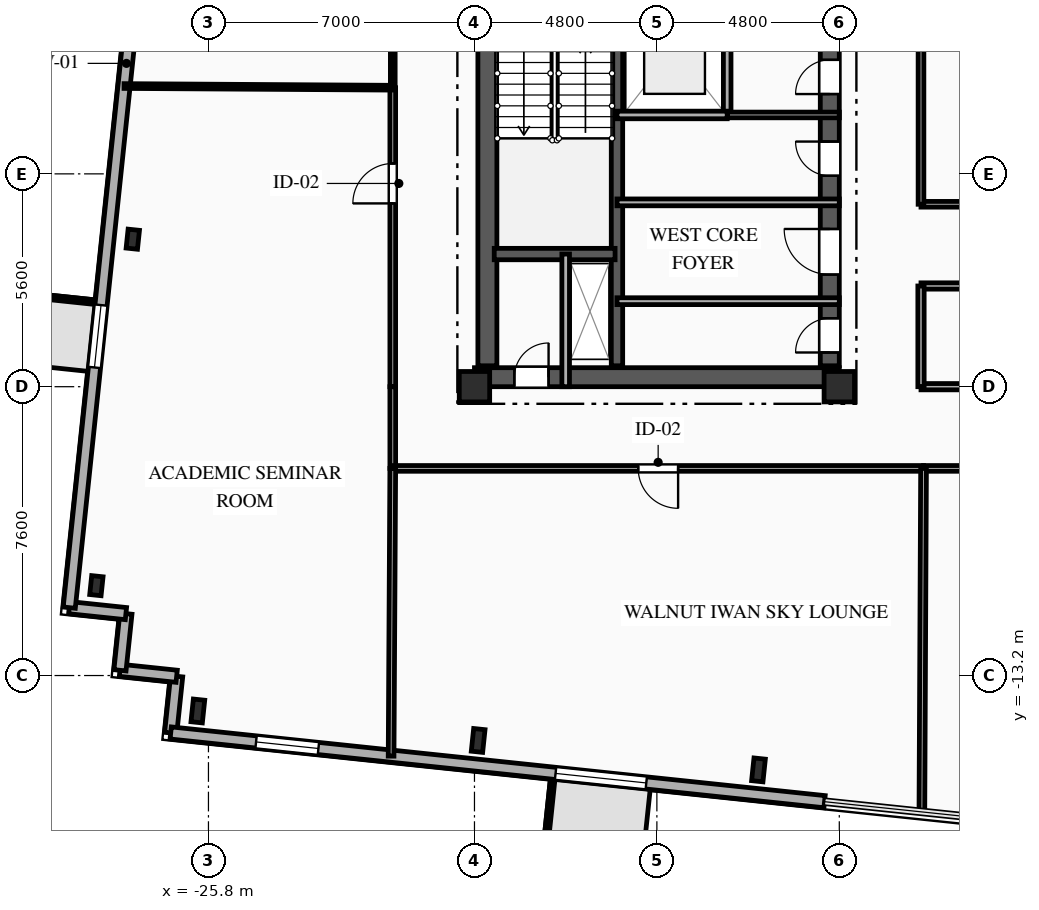
"""IFC4 building model, lengths in metres.
Left out: names, types, materials, properties, quantities, classifications, styles, units other than length and angle.
Written with IfcOpenShell. Run it as: python <this file> out.ifc"""

import sys

from ifc_helpers import new_model, si_unit, direction, frame, frame_2d, origin, origin_2d, place, context, subcontext, project, spatial, rectangle, i_section, extrude, element, fill, save


model = new_model("IFC4")
c1 = context("Model", 3, precision=1e-05, world=origin(), true_north=direction((0.0, 1.0)))
c2 = subcontext(c1, "Body", "Model", "MODEL_VIEW")
j1 = project(units=[si_unit("LENGTHUNIT", "METRE"), si_unit("PLANEANGLEUNIT", "RADIAN")], contexts=[c1])
p1 = place(None, origin())
s1 = spatial("IfcSite", under=j1, at=p1, CompositionType="ELEMENT")
p2 = place(p1, origin())
s2 = spatial("IfcBuilding", under=s1, at=p2, CompositionType="ELEMENT")
p3 = place(p2, frame((0.0, 0.0, 203.1)))
s3 = spatial("IfcBuildingStorey", under=s2, at=p3, CompositionType="ELEMENT", Elevation=203.1)
for number, where, z_axis, x_axis in (
    (1, (-18.8, -5.6, 0.0), (0.0, 0.0, 1.0), (1.0, 0.0, 0.0)),
    (2, (-9.2, -5.6, 0.0), (0.0, 0.0, 1.0), (1.0, 0.0, 0.0)),
):
    element("IfcColumn", number, at=place(p3, frame(where, z_axis=z_axis, x_axis=x_axis)), inside=s3, PredefinedType="COLUMN", context=c2, shape_type="SweptSolid", body=[
        extrude(rectangle(XDim=0.8, YDim=0.8, at=origin_2d()), origin(), (0.0, 0.0, 1.0), 3.35),
    ])
for number, where, z_axis, x_axis in (
    (3, (-26.079, -14.133, 0.0), (0.0, 0.0, 1.0), (0.995, -0.105, 0.0)),
    (4, (-18.703, -14.908, 0.0), (0.0, 0.0, 1.0), (0.995, -0.105, 0.0)),
    (5, (-11.327, -15.683, 0.0), (0.0, 0.0, 1.0), (0.995, -0.105, 0.0)),
):
    element("IfcColumn", number, at=place(p3, frame(where, z_axis=z_axis, x_axis=x_axis)), inside=s3, PredefinedType="COLUMN", context=c2, shape_type="SweptSolid", body=[
        extrude(i_section(OverallWidth=0.3, OverallDepth=0.6, WebThickness=0.015, FlangeThickness=0.03, FilletRadius=0.027, at=origin_2d()), origin(), (0.0, 0.0, 1.0), 3.35),
    ])
for number, where, z_axis, x_axis in (
    (6, (-27.791, -1.719, 0.0), (0.0, 0.0, 1.0), (0.995, -0.105, 0.0)),
    (7, (-28.749, -10.835, 0.0), (0.0, 0.0, 1.0), (0.995, -0.105, 0.0)),
):
    element("IfcColumn", number, at=place(p3, frame(where, z_axis=z_axis, x_axis=x_axis)), inside=s3, PredefinedType="COLUMN", context=c2, shape_type="SweptSolid", body=[
        extrude(i_section(OverallWidth=0.3, OverallDepth=0.5, WebThickness=0.014, FlangeThickness=0.028, FilletRadius=0.027, at=origin_2d()), origin(), (0.0, 0.0, 1.0), 3.35),
    ])
for number, where, z_axis, x_axis in (
    (8, (-26.793, -14.711, 0.0), (0.0, 0.0, 1.0), (0.104, 0.995, 0.0)),
    (9, (-26.637, -13.219, 0.0), (0.0, 0.0, 1.0), (-0.995, 0.104, 0.0)),
):
    element("IfcWall", number, at=place(p3, frame(where, z_axis=z_axis, x_axis=x_axis)), inside=s3, PredefinedType="SOLIDWALL", context=c2, shape_type="SweptSolid", body=[
        extrude(rectangle(XDim=1.5, YDim=0.32, at=frame_2d((0.75, 0.0))), origin(), (0.0, 0.0, 1.0), 3.04),
    ])
p4 = place(p3, frame((-28.128, -13.062, 0.0), z_axis=(0.0, 0.0, 1.0), x_axis=(0.104481464157, 0.994526834051, 0.0)))
e10 = element("IfcWall", 10, at=p4, inside=s3, PredefinedType="SOLIDWALL", context=c2, shape_type="SweptSolid", body=[
    extrude(rectangle(XDim=1.5, YDim=0.32, at=frame_2d((0.75, 0.0))), origin(), (0.0, 0.0, 1.0), 3.04),
])
p5 = place(p3, frame((-27.972, -11.571, 0.0), z_axis=(0.0, 0.0, 1.0), x_axis=(-0.994525057048, 0.104498377516, 0.0)))
e11 = element("IfcWall", 11, at=p5, inside=s3, PredefinedType="SOLIDWALL", context=c2, shape_type="SweptSolid", body=[
    extrude(rectangle(XDim=1.5, YDim=0.32, at=frame_2d((0.75, 0.0))), origin(), (0.0, 0.0, 1.0), 3.04),
])
p6 = place(p3, frame((-29.463, -11.414, 0.0), z_axis=(0.0, 0.0, 1.0), x_axis=(0.104530779244, 0.994521651947, 0.0)))
e12 = element("IfcWall", 12, at=p6, inside=s3, PredefinedType="SOLIDWALL", context=c2, shape_type="SweptSolid", body=[
    extrude(rectangle(XDim=28.8, YDim=0.32, at=frame_2d((14.4, 0.0))), origin(), (0.0, 0.0, 1.0), 3.04),
])
p7 = place(p6, frame((6.355, 0.0, 0.85)))
e13 = element("IfcOpeningElement", 13, at=p7, cuts=e12, PredefinedType="OPENING", context=c2, shape_type="SweptSolid", body=[
    extrude(rectangle(XDim=1.65, YDim=1.85, at=frame_2d((0.825, 0.925))), frame((0.0, 0.17, 0.0), z_axis=(0.0, -1.0, 0.0), x_axis=(1.0, 0.0, 0.0)), (0.0, 0.0, 1.0), 0.34),
])
p8 = place(p6, frame((20.339, 0.0, 0.85)))
e14 = element("IfcOpeningElement", 14, at=p8, cuts=e12, PredefinedType="OPENING", context=c2, shape_type="SweptSolid", body=[
    extrude(rectangle(XDim=1.6, YDim=1.85, at=frame_2d((0.8, 0.925))), frame((0.0, 0.17, 0.0), z_axis=(0.0, -1.0, 0.0), x_axis=(1.0, 0.0, 0.0)), (0.0, 0.0, 1.0), 0.34),
])
p9 = place(p3, frame((-9.588, -16.519, 0.0), z_axis=(0.0, 0.0, 1.0), x_axis=(-0.994521911171, 0.104528312915, 0.0)))
e15 = element("IfcWall", 15, at=p9, inside=s3, PredefinedType="SOLIDWALL", context=c2, shape_type="SweptSolid", body=[
    extrude(rectangle(XDim=17.3, YDim=0.32, at=frame_2d((8.65, 0.0))), origin(), (0.0, 0.0, 1.0), 3.04),
])
p10 = place(p9, frame((4.717, 0.0, 0.85)))
e16 = element("IfcOpeningElement", 16, at=p10, cuts=e15, PredefinedType="OPENING", context=c2, shape_type="SweptSolid", body=[
    extrude(rectangle(XDim=2.4, YDim=1.95, at=frame_2d((1.2, 0.975))), frame((0.0, 0.17, 0.0), z_axis=(0.0, -1.0, 0.0), x_axis=(1.0, 0.0, 0.0)), (0.0, 0.0, 1.0), 0.34),
])
p11 = place(p9, frame((13.392, 0.0, 0.85)))
e17 = element("IfcOpeningElement", 17, at=p11, cuts=e15, PredefinedType="OPENING", context=c2, shape_type="SweptSolid", body=[
    extrude(rectangle(XDim=1.65, YDim=1.85, at=frame_2d((0.825, 0.925))), frame((0.0, 0.17, 0.0), z_axis=(0.0, -1.0, 0.0), x_axis=(1.0, 0.0, 0.0)), (0.0, 0.0, 1.0), 0.34),
])
p12 = place(p3, frame((-18.8, -5.35, 0.0), z_axis=(0.0, 0.0, 1.0), x_axis=(1.0, 0.0, 0.0)))
e18 = element("IfcWall", 18, at=p12, inside=s3, PredefinedType="SHEAR", context=c2, shape_type="SweptSolid", body=[
    extrude(rectangle(XDim=9.6, YDim=0.5, at=frame_2d((4.8, 0.0))), origin(), (0.0, 0.0, 1.0), 3.04),
])
p13 = place(p12, frame((1.05, 0.0, 0.0)))
e19 = element("IfcOpeningElement", 19, at=p13, cuts=e18, PredefinedType="OPENING", context=c2, shape_type="SweptSolid", body=[
    extrude(rectangle(XDim=0.9, YDim=2.1, at=frame_2d((0.45, 1.05))), frame((0.0, 0.26, 0.0), z_axis=(0.0, -1.0, 0.0), x_axis=(1.0, 0.0, 0.0)), (0.0, 0.0, 1.0), 0.52),
])
p14 = place(p3, frame((-18.46, -5.05, 0.0), z_axis=(0.0, 0.0, 1.0), x_axis=(0.0, 1.0, 0.0)))
e20 = element("IfcWall", 20, at=p14, inside=s3, PredefinedType="SHEAR", context=c2, shape_type="SweptSolid", body=[
    extrude(rectangle(XDim=10.1, YDim=0.5, at=frame_2d((5.05, 0.0))), origin(), (0.0, 0.0, 1.0), 3.04),
])
p15 = place(p3, frame((-9.45, -5.05, 0.0), z_axis=(0.0, 0.0, 1.0), x_axis=(0.0, 1.0, 0.0)))
e21 = element("IfcWall", 21, at=p15, inside=s3, PredefinedType="SHEAR", context=c2, shape_type="SweptSolid", body=[
    extrude(rectangle(XDim=10.1, YDim=0.5, at=frame_2d((5.05, 0.0))), origin(), (0.0, 0.0, 1.0), 3.04),
])
p16 = place(p15, frame((7.15, 0.0, 0.0)))
e22 = element("IfcOpeningElement", 22, at=p16, cuts=e21, PredefinedType="OPENING", context=c2, shape_type="SweptSolid", body=[
    extrude(rectangle(XDim=0.9, YDim=2.1, at=frame_2d((0.45, 1.05))), frame((0.0, 0.26, 0.0), z_axis=(0.0, -1.0, 0.0), x_axis=(1.0, 0.0, 0.0)), (0.0, 0.0, 1.0), 0.52),
])
p17 = place(p15, frame((2.4, 0.0, 0.0)))
e23 = element("IfcOpeningElement", 23, at=p17, cuts=e21, PredefinedType="OPENING", context=c2, shape_type="SweptSolid", body=[
    extrude(rectangle(XDim=1.2, YDim=2.15, at=frame_2d((0.6, 1.075))), frame((0.0, 0.26, 0.0), z_axis=(0.0, -1.0, 0.0), x_axis=(1.0, 0.0, 0.0)), (0.0, 0.0, 1.0), 0.52),
])
p18 = place(p15, frame((0.35, 0.0, 0.0)))
e24 = element("IfcOpeningElement", 24, at=p18, cuts=e21, PredefinedType="OPENING", context=c2, shape_type="SweptSolid", body=[
    extrude(rectangle(XDim=0.9, YDim=2.1, at=frame_2d((0.45, 1.05))), frame((0.0, 0.26, 0.0), z_axis=(0.0, -1.0, 0.0), x_axis=(1.0, 0.0, 0.0)), (0.0, 0.0, 1.0), 0.52),
])
p19 = place(p15, frame((5.0, 0.0, 0.0)))
e25 = element("IfcOpeningElement", 25, at=p19, cuts=e21, PredefinedType="OPENING", context=c2, shape_type="SweptSolid", body=[
    extrude(rectangle(XDim=0.9, YDim=2.1, at=frame_2d((0.45, 1.05))), frame((0.0, 0.26, 0.0), z_axis=(0.0, -1.0, 0.0), x_axis=(1.0, 0.0, 0.0)), (0.0, 0.0, 1.0), 0.52),
])
p20 = place(p3, frame((-15.05, -5.05, 0.0), z_axis=(0.0, 0.0, 1.0), x_axis=(0.0, 1.0, 0.0)))
e26 = element("IfcWall", 26, at=p20, inside=s3, PredefinedType="SHEAR", context=c2, shape_type="SweptSolid", body=[
    extrude(rectangle(XDim=10.1, YDim=0.3, at=frame_2d((5.05, 0.0))), origin(), (0.0, 0.0, 1.0), 3.04),
])
p21 = place(p3, frame((-18.28, -2.11, 0.0), z_axis=(0.0, 0.0, 1.0), x_axis=(1.0, 0.0, 0.0)))
e27 = element("IfcWall", 27, at=p21, inside=s3, PredefinedType="SHEAR", context=c2, shape_type="SweptSolid", body=[
    extrude(rectangle(XDim=3.18, YDim=0.3, at=frame_2d((1.59, 0.0))), origin(), (0.0, 0.0, 1.0), 3.04),
])
p22 = place(p3, frame((-16.4, -5.6, 0.0), z_axis=(0.0, 0.0, 1.0), x_axis=(0.0, 1.0, 0.0)))
e28 = element("IfcWall", 28, at=p22, inside=s3, PredefinedType="PARTITIONING", context=c2, shape_type="SweptSolid", body=[
    extrude(rectangle(XDim=3.49, YDim=0.2, at=frame_2d((1.745, 0.0))), origin(), (0.0, 0.0, 1.0), 3.04),
])
p23 = place(p3, frame((-12.15, 1.55, 0.0), z_axis=(0.0, 0.0, 1.0), x_axis=(0.0, 1.0, 0.0)))
e29 = element("IfcWall", 29, at=p23, inside=s3, PredefinedType="PARTITIONING", context=c2, shape_type="SweptSolid", body=[
    extrude(rectangle(XDim=4.05, YDim=0.2, at=frame_2d((2.025, 0.0))), origin(), (0.0, 0.0, 1.0), 3.04),
])
p24 = place(p3, frame((-12.15, 1.55, 0.0), z_axis=(0.0, 0.0, 1.0), x_axis=(1.0, 0.0, 0.0)))
e30 = element("IfcWall", 30, at=p24, inside=s3, PredefinedType="PARTITIONING", context=c2, shape_type="SweptSolid", body=[
    extrude(rectangle(XDim=2.95, YDim=0.15, at=frame_2d((1.475, 0.0))), origin(), (0.0, 0.0, 1.0), 3.04),
])
p25 = place(p3, frame((-15.05, -3.35, 0.0), z_axis=(0.0, 0.0, 1.0), x_axis=(1.0, 0.0, 0.0)))
e31 = element("IfcWall", 31, at=p25, inside=s3, PredefinedType="PARTITIONING", context=c2, shape_type="SweptSolid", body=[
    extrude(rectangle(XDim=5.85, YDim=0.18, at=frame_2d((2.925, 0.0))), origin(), (0.0, 0.0, 1.0), 2.755),
])
p26 = place(p3, frame((-9.2, -0.75, 0.0), z_axis=(0.0, 0.0, 1.0), x_axis=(-1.0, 0.0, 0.0)))
e32 = element("IfcWall", 32, at=p26, inside=s3, PredefinedType="PARTITIONING", context=c2, shape_type="SweptSolid", body=[
    extrude(rectangle(XDim=5.85, YDim=0.18, at=frame_2d((2.925, 0.0))), origin(), (0.0, 0.0, 1.0), 3.04),
])
p27 = place(p3, frame((-20.95, -7.75, 0.0), z_axis=(0.0, 0.0, 1.0), x_axis=(0.0, 1.0, 0.0)))
e33 = element("IfcWall", 33, at=p27, inside=s3, PredefinedType="PARTITIONING", context=c2, shape_type="SweptSolid", body=[
    extrude(rectangle(XDim=2.15, YDim=0.15, at=frame_2d((1.075, 0.0))), origin(), (0.0, 0.0, 1.0), 3.04),
])
p28 = place(p3, frame((-6.983, -7.75, 0.0), z_axis=(0.0, 0.0, 1.0), x_axis=(-1.0, 0.0, 0.0)))
e34 = element("IfcWall", 34, at=p28, inside=s3, PredefinedType="PARTITIONING", context=c2, shape_type="SweptSolid", body=[
    extrude(rectangle(XDim=13.967, YDim=0.15, at=frame_2d((6.983, 0.0))), origin(), (0.0, 0.0, 1.0), 3.04),
])
p29 = place(p28, frame((6.458, 0.0, 0.0)))
e35 = element("IfcOpeningElement", 35, at=p29, cuts=e34, PredefinedType="OPENING", context=c2, shape_type="SweptSolid", body=[
    extrude(rectangle(XDim=1.05, YDim=2.15, at=frame_2d((0.525, 1.075))), frame((0.0, 0.085, 0.0), z_axis=(0.0, -1.0, 0.0), x_axis=(1.0, 0.0, 0.0)), (0.0, 0.0, 1.0), 0.17),
])
p30 = place(p3, frame((0.0, -7.75, 0.0), z_axis=(0.0, 0.0, 1.0), x_axis=(-1.0, 0.0, 0.0)))
e36 = element("IfcWall", 36, at=p30, inside=s3, PredefinedType="PARTITIONING", context=c2, shape_type="SweptSolid", body=[
    extrude(rectangle(XDim=6.983, YDim=0.15, at=frame_2d((3.491, 0.0))), origin(), (0.0, 0.0, 1.0), 3.04),
])
p31 = place(p30, frame((1.177, 0.0, 0.0)))
e37 = element("IfcOpeningElement", 37, at=p31, cuts=e36, PredefinedType="OPENING", context=c2, shape_type="SweptSolid", body=[
    extrude(rectangle(XDim=1.05, YDim=2.15, at=frame_2d((0.525, 1.075))), frame((0.0, 0.085, 0.0), z_axis=(0.0, -1.0, 0.0), x_axis=(1.0, 0.0, 0.0)), (0.0, 0.0, 1.0), 0.17),
])
p32 = place(p3, frame((-7.05, -5.6, 0.0), z_axis=(0.0, 0.0, 1.0), x_axis=(1.0, 0.0, 0.0)))
e38 = element("IfcWall", 38, at=p32, inside=s3, PredefinedType="PARTITIONING", context=c2, shape_type="SweptSolid", body=[
    extrude(rectangle(XDim=7.05, YDim=0.165, at=frame_2d((3.525, 0.0))), origin(), (0.0, 0.0, 1.0), 2.525),
])
p33 = place(p3, frame((-20.95, -5.6, 0.0), z_axis=(0.0, 0.0, 1.0), x_axis=(0.0, 1.0, 0.0)))
e39 = element("IfcWall", 39, at=p33, inside=s3, PredefinedType="PARTITIONING", context=c2, shape_type="SweptSolid", body=[
    extrude(rectangle(XDim=7.867, YDim=0.15, at=frame_2d((3.934, 0.0))), origin(), (0.0, 0.0, 1.0), 3.04),
])
p34 = place(p33, frame((4.823, 0.0, 0.0)))
e40 = element("IfcOpeningElement", 40, at=p34, cuts=e39, PredefinedType="OPENING", context=c2, shape_type="SweptSolid", body=[
    extrude(rectangle(XDim=1.05, YDim=2.15, at=frame_2d((0.525, 1.075))), frame((0.0, 0.085, 0.0), z_axis=(0.0, -1.0, 0.0), x_axis=(1.0, 0.0, 0.0)), (0.0, 0.0, 1.0), 0.17),
])
p35 = place(p3, frame((-20.95, 2.267, 0.0), z_axis=(0.0, 0.0, 1.0), x_axis=(0.0, 1.0, 0.0)))
e41 = element("IfcWall", 41, at=p35, inside=s3, PredefinedType="PARTITIONING", context=c2, shape_type="SweptSolid", body=[
    extrude(rectangle(XDim=6.233, YDim=0.125, at=frame_2d((3.116, 0.0))), origin(), (0.0, 0.0, 1.0), 3.04),
])
p36 = place(p35, frame((1.095, 0.0, 0.0)))
e42 = element("IfcOpeningElement", 42, at=p36, cuts=e41, PredefinedType="OPENING", context=c2, shape_type="SweptSolid", body=[
    extrude(rectangle(XDim=0.95, YDim=2.1, at=frame_2d((0.475, 1.05))), frame((0.0, 0.073, 0.0), z_axis=(0.0, -1.0, 0.0), x_axis=(1.0, 0.0, 0.0)), (0.0, 0.0, 1.0), 0.145),
])
p37 = place(p3, frame((-7.05, -0.8, 0.0), z_axis=(0.0, 0.0, 1.0), x_axis=(1.0, 0.0, 0.0)))
e43 = element("IfcWall", 43, at=p37, inside=s3, PredefinedType="PARTITIONING", context=c2, shape_type="SweptSolid", body=[
    extrude(rectangle(XDim=14.1, YDim=0.15, at=frame_2d((7.05, 0.0))), origin(), (0.0, 0.0, 1.0), 3.04),
])
p38 = place(p37, frame((6.525, 0.0, 0.0)))
e44 = element("IfcOpeningElement", 44, at=p38, cuts=e43, PredefinedType="OPENING", context=c2, shape_type="SweptSolid", body=[
    extrude(rectangle(XDim=1.05, YDim=2.15, at=frame_2d((0.525, 1.075))), frame((0.0, 0.085, 0.0), z_axis=(0.0, -1.0, 0.0), x_axis=(1.0, 0.0, 0.0)), (0.0, 0.0, 1.0), 0.17),
])
p39 = place(p3, frame((7.05, -2.95, 0.0), z_axis=(0.0, 0.0, 1.0), x_axis=(-1.0, 0.0, 0.0)))
e45 = element("IfcWall", 45, at=p39, inside=s3, PredefinedType="PARTITIONING", context=c2, shape_type="SweptSolid", body=[
    extrude(rectangle(XDim=14.1, YDim=0.165, at=frame_2d((7.05, 0.0))), origin(), (0.0, 0.0, 1.0), 3.04),
])
p40 = place(p39, frame((6.475, 0.0, 0.0)))
e46 = element("IfcOpeningElement", 46, at=p40, cuts=e45, PredefinedType="OPENING", context=c2, shape_type="SweptSolid", body=[
    extrude(rectangle(XDim=1.15, YDim=2.15, at=frame_2d((0.575, 1.075))), frame((0.0, 0.093, 0.0), z_axis=(0.0, -1.0, 0.0), x_axis=(1.0, 0.0, 0.0)), (0.0, 0.0, 1.0), 0.185),
])
p41 = place(p3, frame((-7.05, 8.5, 0.0), z_axis=(0.0, 0.0, 1.0), x_axis=(0.0, -1.0, 0.0)))
e47 = element("IfcWall", 47, at=p41, inside=s3, PredefinedType="PARTITIONING", context=c2, shape_type="SweptSolid", body=[
    extrude(rectangle(XDim=9.3, YDim=0.15, at=frame_2d((4.65, 0.0))), origin(), (0.0, 0.0, 1.0), 3.04),
])
p42 = place(p3, frame((-7.05, -2.95, 0.0), z_axis=(0.0, 0.0, 1.0), x_axis=(0.0, -1.0, 0.0)))
e48 = element("IfcWall", 48, at=p42, inside=s3, PredefinedType="PARTITIONING", context=c2, shape_type="SweptSolid", body=[
    extrude(rectangle(XDim=2.65, YDim=0.165, at=frame_2d((1.325, 0.0))), origin(), (0.0, 0.0, 1.0), 3.04),
])
p43 = place(p3, frame((-28.021, 2.311, 0.0), z_axis=(0.0, 0.0, 1.0), x_axis=(0.99998090118, -0.006180394355, 0.0)))
e49 = element("IfcWall", 49, at=p43, inside=s3, PredefinedType="PARTITIONING", context=c2, shape_type="SweptSolid", body=[
    extrude(rectangle(XDim=7.071, YDim=0.125, at=frame_2d((3.536, 0.0))), origin(), (0.0, 0.0, 1.0), 3.04),
])
p44 = place(p3, frame((-20.95, -7.75, 0.0), z_axis=(0.0, 0.0, 1.0), x_axis=(-0.005804668564, -0.99998315277, 0.0)))
e50 = element("IfcWall", 50, at=p44, inside=s3, PredefinedType="PARTITIONING", context=c2, shape_type="SweptSolid", body=[
    extrude(rectangle(XDim=7.571, YDim=0.15, at=frame_2d((3.785, 0.0))), origin(), (0.0, 0.0, 1.0), 3.04),
])
p45 = place(p3, frame((-6.983, -7.75, 0.0), z_axis=(0.0, 0.0, 1.0), x_axis=(-0.004861916497, -0.999988180814, 0.0)))
e51 = element("IfcWall", 51, at=p45, inside=s3, PredefinedType="PARTITIONING", context=c2, shape_type="SweptSolid", body=[
    extrude(rectangle(XDim=9.039, YDim=0.15, at=frame_2d((4.519, 0.0))), origin(), (0.0, 0.0, 1.0), 3.04),
])
p46 = place(p3, frame((-15.05, 1.55, 0.0), z_axis=(0.0, 0.0, 1.0), x_axis=(1.0, 0.0, 0.0)))
e52 = element("IfcWall", 52, at=p46, inside=s3, PredefinedType="PARTITIONING", context=c2, shape_type="SweptSolid", body=[
    extrude(rectangle(XDim=2.9, YDim=0.2, at=frame_2d((1.45, 0.0))), origin(), (0.0, 0.0, 1.0), 3.04),
])
p47 = place(p7, origin())
e53 = element("IfcWindow", 53, at=p47, inside=s3, PartitioningType="SINGLE_PANEL", PredefinedType="WINDOW", context=c2, shape_type="SweptSolid", body=[
    extrude(rectangle(XDim=1.65, YDim=1.85, at=frame_2d((0.825, 0.925))), frame((0.0, 0.03, 0.0), z_axis=(0.0, -1.0, 0.0), x_axis=(1.0, 0.0, 0.0)), (0.0, 0.0, 1.0), 0.06),
])
fill(e13, e53)
p48 = place(p10, origin())
e54 = element("IfcWindow", 54, at=p48, inside=s3, PartitioningType="SINGLE_PANEL", PredefinedType="WINDOW", context=c2, shape_type="SweptSolid", body=[
    extrude(rectangle(XDim=2.4, YDim=1.95, at=frame_2d((1.2, 0.975))), frame((0.0, 0.03, 0.0), z_axis=(0.0, -1.0, 0.0), x_axis=(1.0, 0.0, 0.0)), (0.0, 0.0, 1.0), 0.06),
])
fill(e16, e54)
p49 = place(p11, origin())
e55 = element("IfcWindow", 55, at=p49, inside=s3, PartitioningType="SINGLE_PANEL", PredefinedType="WINDOW", context=c2, shape_type="SweptSolid", body=[
    extrude(rectangle(XDim=1.65, YDim=1.85, at=frame_2d((0.825, 0.925))), frame((0.0, 0.03, 0.0), z_axis=(0.0, -1.0, 0.0), x_axis=(1.0, 0.0, 0.0)), (0.0, 0.0, 1.0), 0.06),
])
fill(e17, e55)
p50 = place(p13, origin())
e56 = element("IfcDoor", 56, at=p50, inside=s3, OperationType="SINGLE_SWING_RIGHT", PredefinedType="DOOR", context=c2, shape_type="SweptSolid", body=[
    extrude(rectangle(XDim=0.9, YDim=2.1, at=frame_2d((0.45, 1.05))), frame((0.0, 0.025, 0.0), z_axis=(0.0, -1.0, 0.0), x_axis=(1.0, 0.0, 0.0)), (0.0, 0.0, 1.0), 0.05),
])
fill(e19, e56)
p51 = place(p16, origin())
e57 = element("IfcDoor", 57, at=p51, inside=s3, OperationType="SINGLE_SWING_LEFT", PredefinedType="DOOR", context=c2, shape_type="SweptSolid", body=[
    extrude(rectangle(XDim=0.9, YDim=2.1, at=frame_2d((0.45, 1.05))), frame((0.0, 0.025, 0.0), z_axis=(0.0, -1.0, 0.0), x_axis=(1.0, 0.0, 0.0)), (0.0, 0.0, 1.0), 0.05),
])
fill(e22, e57)
p52 = place(p17, origin())
e58 = element("IfcDoor", 58, at=p52, inside=s3, OperationType="SINGLE_SWING_RIGHT", PredefinedType="DOOR", context=c2, shape_type="SweptSolid", body=[
    extrude(rectangle(XDim=1.2, YDim=2.15, at=frame_2d((0.6, 1.075))), frame((0.0, 0.025, 0.0), z_axis=(0.0, -1.0, 0.0), x_axis=(1.0, 0.0, 0.0)), (0.0, 0.0, 1.0), 0.05),
])
fill(e23, e58)
p53 = place(p18, origin())
e59 = element("IfcDoor", 59, at=p53, inside=s3, OperationType="SINGLE_SWING_LEFT", PredefinedType="DOOR", context=c2, shape_type="SweptSolid", body=[
    extrude(rectangle(XDim=0.9, YDim=2.1, at=frame_2d((0.45, 1.05))), frame((0.0, 0.025, 0.0), z_axis=(0.0, -1.0, 0.0), x_axis=(1.0, 0.0, 0.0)), (0.0, 0.0, 1.0), 0.05),
])
fill(e24, e59)
p54 = place(p19, origin())
e60 = element("IfcDoor", 60, at=p54, inside=s3, OperationType="SINGLE_SWING_RIGHT", PredefinedType="DOOR", context=c2, shape_type="SweptSolid", body=[
    extrude(rectangle(XDim=0.9, YDim=2.1, at=frame_2d((0.45, 1.05))), frame((0.0, 0.025, 0.0), z_axis=(0.0, -1.0, 0.0), x_axis=(1.0, 0.0, 0.0)), (0.0, 0.0, 1.0), 0.05),
])
fill(e25, e60)
p55 = place(p29, origin())
e61 = element("IfcDoor", 61, at=p55, inside=s3, OperationType="SINGLE_SWING_LEFT", PredefinedType="DOOR", context=c2, shape_type="SweptSolid", body=[
    extrude(rectangle(XDim=1.05, YDim=2.15, at=frame_2d((0.525, 1.075))), frame((0.0, 0.025, 0.0), z_axis=(0.0, -1.0, 0.0), x_axis=(1.0, 0.0, 0.0)), (0.0, 0.0, 1.0), 0.05),
])
fill(e35, e61)
p56 = place(p34, origin())
e62 = element("IfcDoor", 62, at=p56, inside=s3, OperationType="SINGLE_SWING_LEFT", PredefinedType="DOOR", context=c2, shape_type="SweptSolid", body=[
    extrude(rectangle(XDim=1.05, YDim=2.15, at=frame_2d((0.525, 1.075))), frame((0.0, 0.025, 0.0), z_axis=(0.0, -1.0, 0.0), x_axis=(1.0, 0.0, 0.0)), (0.0, 0.0, 1.0), 0.05),
])
fill(e40, e62)
save(model, sys.argv[1])
